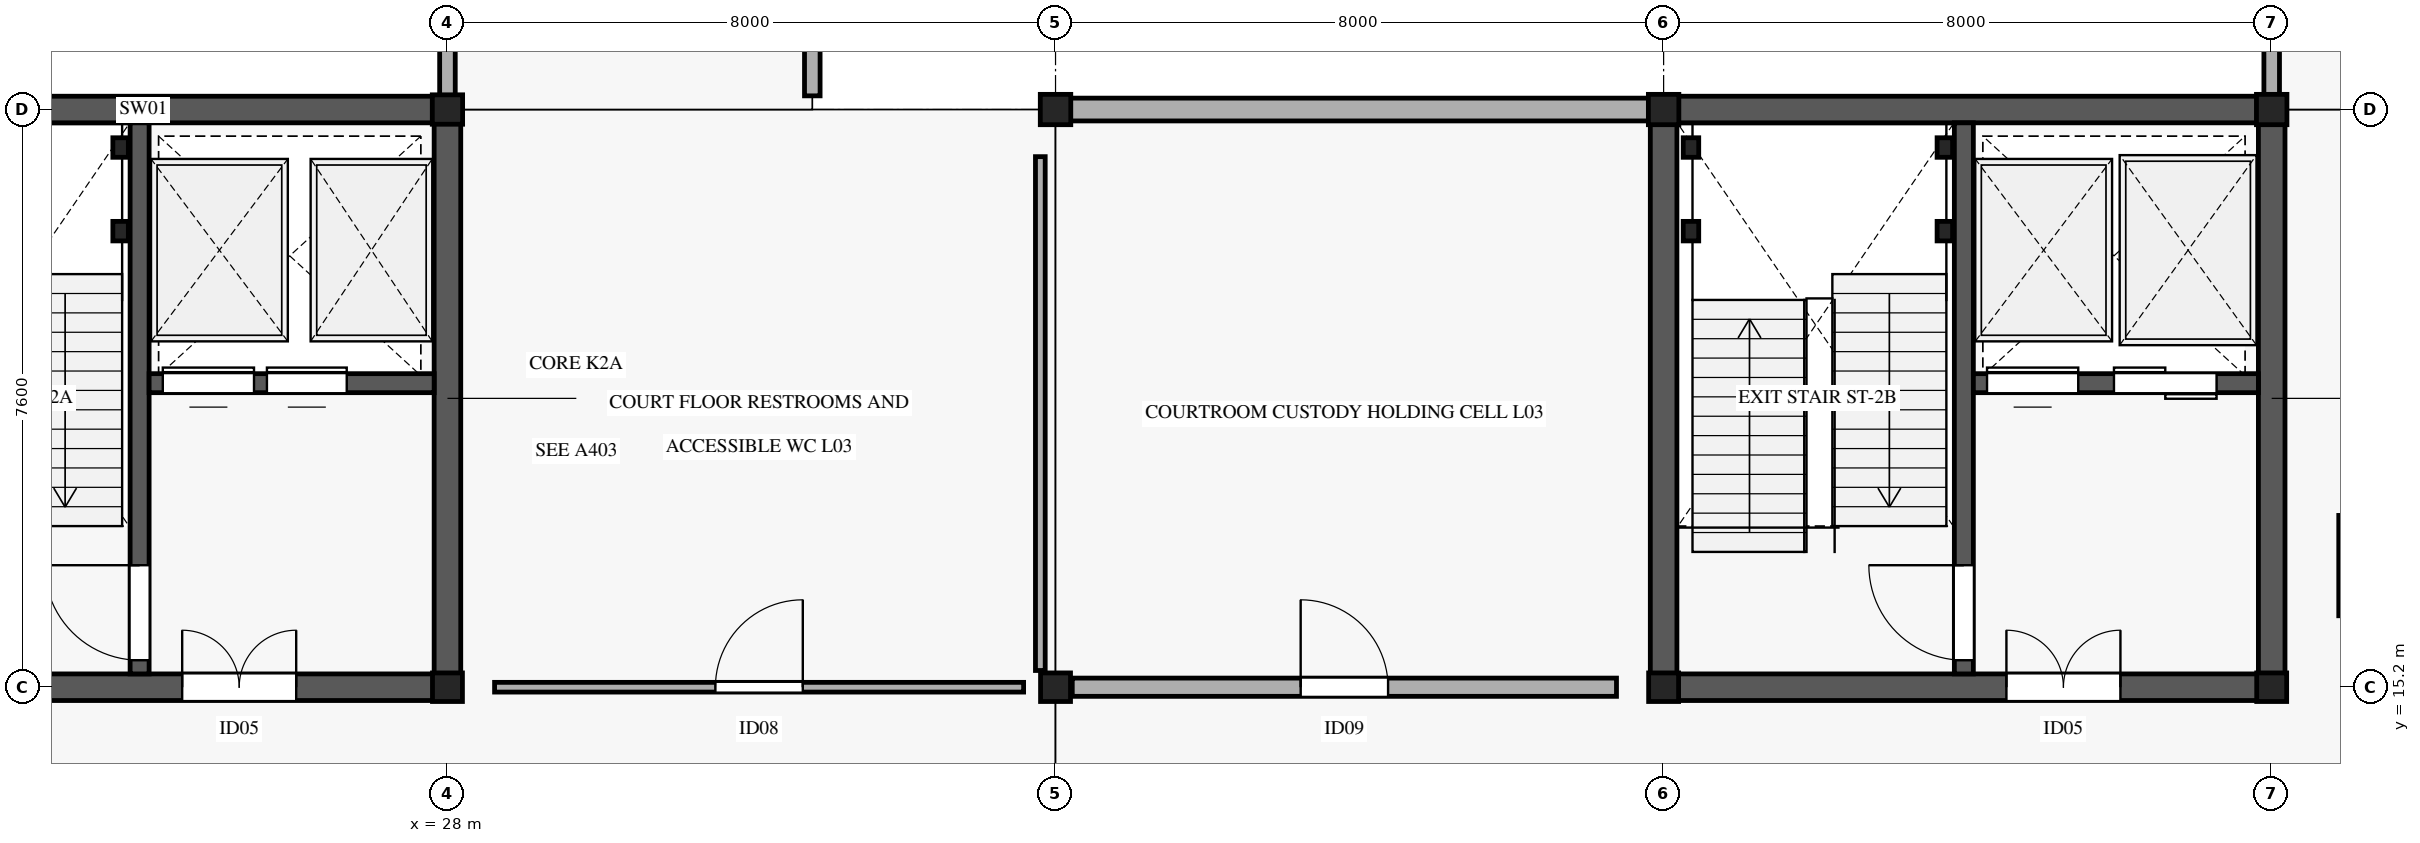
"""IFC4 building model, lengths in metres.
Left out: names, types, materials, properties, quantities, classifications, styles, units other than length and angle.
Written with IfcOpenShell. Run it as: python <this file> out.ifc"""

import sys

from ifc_helpers import new_model, si_unit, direction, frame, frame_2d, origin, origin_2d, place, context, subcontext, project, spatial, rectangle, i_section, extrude, element, fill, save


model = new_model("IFC4")
c1 = context("Model", 3, precision=1e-05, world=origin(), true_north=direction((0.0, 1.0)))
c2 = subcontext(c1, "Body", "Model", "MODEL_VIEW")
j1 = project(units=[si_unit("LENGTHUNIT", "METRE"), si_unit("PLANEANGLEUNIT", "RADIAN")], contexts=[c1])
p1 = place(None, origin())
s1 = spatial("IfcSite", under=j1, at=p1, CompositionType="ELEMENT")
p2 = place(p1, origin())
s2 = spatial("IfcBuilding", under=s1, at=p2, CompositionType="ELEMENT")
p3 = place(p2, frame((0.0, 0.0, 15.6)))
s3 = spatial("IfcBuildingStorey", under=s2, at=p3, CompositionType="ELEMENT", Elevation=15.6)
p4 = place(p3, frame((28.0, 15.2, 0.0), z_axis=(0.0, 0.0, 1.0), x_axis=(1.0, 0.0, 0.0)))
e1 = element("IfcColumn", 1, at=p4, inside=s3, PredefinedType="COLUMN", context=c2, shape_type="SweptSolid", body=[
    extrude(i_section(OverallWidth=0.394, OverallDepth=0.376, WebThickness=0.017, FlangeThickness=0.028, FilletRadius=0.015, at=origin_2d()), origin(), (0.0, 0.0, 1.0), 4.59),
])
p5 = place(p3, frame((28.0, 22.8, 0.0), z_axis=(0.0, 0.0, 1.0), x_axis=(1.0, 0.0, 0.0)))
e2 = element("IfcColumn", 2, at=p5, inside=s3, PredefinedType="COLUMN", context=c2, shape_type="SweptSolid", body=[
    extrude(i_section(OverallWidth=0.399, OverallDepth=0.387, WebThickness=0.021, FlangeThickness=0.033, FilletRadius=0.015, at=origin_2d()), origin(), (0.0, 0.0, 1.0), 4.59),
])
p6 = place(p3, frame((36.0, 15.2, 0.0), z_axis=(0.0, 0.0, 1.0), x_axis=(1.0, 0.0, 0.0)))
e3 = element("IfcColumn", 3, at=p6, inside=s3, PredefinedType="COLUMN", context=c2, shape_type="SweptSolid", body=[
    extrude(i_section(OverallWidth=0.394, OverallDepth=0.376, WebThickness=0.017, FlangeThickness=0.028, FilletRadius=0.015, at=origin_2d()), origin(), (0.0, 0.0, 1.0), 4.59),
])
p7 = place(p3, frame((36.0, 22.8, 0.0), z_axis=(0.0, 0.0, 1.0), x_axis=(1.0, 0.0, 0.0)))
e4 = element("IfcColumn", 4, at=p7, inside=s3, PredefinedType="COLUMN", context=c2, shape_type="SweptSolid", body=[
    extrude(i_section(OverallWidth=0.401, OverallDepth=0.399, WebThickness=0.025, FlangeThickness=0.04, FilletRadius=0.015, at=origin_2d()), origin(), (0.0, 0.0, 1.0), 4.59),
])
p8 = place(p3, frame((44.0, 15.2, 0.0), z_axis=(0.0, 0.0, 1.0), x_axis=(1.0, 0.0, 0.0)))
e5 = element("IfcColumn", 5, at=p8, inside=s3, PredefinedType="COLUMN", context=c2, shape_type="SweptSolid", body=[
    extrude(i_section(OverallWidth=0.394, OverallDepth=0.376, WebThickness=0.017, FlangeThickness=0.028, FilletRadius=0.015, at=origin_2d()), origin(), (0.0, 0.0, 1.0), 4.59),
])
p9 = place(p3, frame((44.0, 22.8, 0.0), z_axis=(0.0, 0.0, 1.0), x_axis=(1.0, 0.0, 0.0)))
e6 = element("IfcColumn", 6, at=p9, inside=s3, PredefinedType="COLUMN", context=c2, shape_type="SweptSolid", body=[
    extrude(i_section(OverallWidth=0.401, OverallDepth=0.399, WebThickness=0.025, FlangeThickness=0.04, FilletRadius=0.015, at=origin_2d()), origin(), (0.0, 0.0, 1.0), 4.59),
])
p10 = place(p3, frame((52.0, 15.2, 0.0), z_axis=(0.0, 0.0, 1.0), x_axis=(1.0, 0.0, 0.0)))
e7 = element("IfcColumn", 7, at=p10, inside=s3, PredefinedType="COLUMN", context=c2, shape_type="SweptSolid", body=[
    extrude(i_section(OverallWidth=0.394, OverallDepth=0.376, WebThickness=0.017, FlangeThickness=0.028, FilletRadius=0.015, at=origin_2d()), origin(), (0.0, 0.0, 1.0), 4.59),
])
p11 = place(p3, frame((52.0, 22.8, 0.0), z_axis=(0.0, 0.0, 1.0), x_axis=(1.0, 0.0, 0.0)))
e8 = element("IfcColumn", 8, at=p11, inside=s3, PredefinedType="COLUMN", context=c2, shape_type="SweptSolid", body=[
    extrude(i_section(OverallWidth=0.401, OverallDepth=0.399, WebThickness=0.025, FlangeThickness=0.04, FilletRadius=0.015, at=origin_2d()), origin(), (0.0, 0.0, 1.0), 4.59),
])
p12 = place(p3, frame((35.98, 22.8, 0.0), z_axis=(0.0, 0.0, 1.0), x_axis=(1.0, 0.0, 0.0)))
e9 = element("IfcWall", 9, at=p12, inside=s3, PredefinedType="STANDARD", context=c2, shape_type="SweptSolid", body=[
    extrude(rectangle(XDim=8.04, YDim=0.3, at=frame_2d((4.02, 0.0))), origin(), (0.0, 0.0, 1.0), 3.46),
])
p13 = place(p3, frame((28.0, 22.98, 0.0), z_axis=(0.0, 0.0, 1.0), x_axis=(0.0, 1.0, 0.0)))
e10 = element("IfcWall", 10, at=p13, inside=s3, PredefinedType="STANDARD", context=c2, shape_type="SweptSolid", body=[
    extrude(rectangle(XDim=22.84, YDim=0.205, at=frame_2d((11.42, 0.0))), origin(), (0.0, 0.0, 1.0), 4.02),
])
p14 = place(p13, frame((10.195, 0.0, 0.85)))
e11 = element("IfcOpeningElement", 11, at=p14, cuts=e10, PredefinedType="OPENING", context=c2, shape_type="SweptSolid", body=[
    extrude(rectangle(XDim=2.45, YDim=1.55, at=frame_2d((1.225, 0.775))), frame((0.0, 0.113, 0.0), z_axis=(0.0, -1.0, 0.0), x_axis=(1.0, 0.0, 0.0)), (0.0, 0.0, 1.0), 0.225),
])
p15 = place(p3, frame((32.8, 45.82, 0.0), z_axis=(0.0, 0.0, 1.0), x_axis=(0.0, -1.0, 0.0)))
e12 = element("IfcWall", 12, at=p15, inside=s3, PredefinedType="STANDARD", context=c2, shape_type="SweptSolid", body=[
    extrude(rectangle(XDim=22.84, YDim=0.205, at=frame_2d((11.42, 0.0))), origin(), (0.0, 0.0, 1.0), 4.02),
])
p16 = place(p15, frame((10.195, 0.0, 0.85)))
e13 = element("IfcOpeningElement", 13, at=p16, cuts=e12, PredefinedType="OPENING", context=c2, shape_type="SweptSolid", body=[
    extrude(rectangle(XDim=2.45, YDim=1.55, at=frame_2d((1.225, 0.775))), frame((0.0, 0.113, 0.0), z_axis=(0.0, -1.0, 0.0), x_axis=(1.0, 0.0, 0.0)), (0.0, 0.0, 1.0), 0.225),
])
p17 = place(p3, frame((52.0, 22.98, 0.0), z_axis=(0.0, 0.0, 1.0), x_axis=(0.0, 1.0, 0.0)))
e14 = element("IfcWall", 14, at=p17, inside=s3, PredefinedType="STANDARD", context=c2, shape_type="SweptSolid", body=[
    extrude(rectangle(XDim=22.84, YDim=0.205, at=frame_2d((11.42, 0.0))), origin(), (0.0, 0.0, 1.0), 4.02),
])
p18 = place(p17, frame((10.195, 0.0, 0.85)))
e15 = element("IfcOpeningElement", 15, at=p18, cuts=e14, PredefinedType="OPENING", context=c2, shape_type="SweptSolid", body=[
    extrude(rectangle(XDim=2.45, YDim=1.55, at=frame_2d((1.225, 0.775))), frame((0.0, 0.113, 0.0), z_axis=(0.0, -1.0, 0.0), x_axis=(1.0, 0.0, 0.0)), (0.0, 0.0, 1.0), 0.225),
])
p19 = place(p3, frame((52.94, 17.46, 0.0), z_axis=(0.0, 0.0, 1.0), x_axis=(0.0, -1.0, 0.0)))
e16 = element("IfcWall", 16, at=p19, inside=s3, PredefinedType="PARTITIONING", context=c2, shape_type="SweptSolid", body=[
    extrude(rectangle(XDim=1.32, YDim=0.115, at=frame_2d((0.66, 0.0))), origin(), (0.0, 0.0, 1.0), 3.75),
])
p20 = place(p3, frame((19.825, 15.2, 0.0), z_axis=(0.0, 0.0, 1.0), x_axis=(1.0, 0.0, 0.0)))
e17 = element("IfcWall", 17, at=p20, inside=s3, PredefinedType="SHEAR", context=c2, shape_type="SweptSolid", body=[
    extrude(rectangle(XDim=8.35, YDim=0.35, at=frame_2d((4.175, 0.0))), origin(), (0.0, 0.0, 1.0), 4.59),
])
p21 = place(p20, frame((4.685, 0.0, 0.0)))
e18 = element("IfcOpeningElement", 18, at=p21, cuts=e17, PredefinedType="OPENING", context=c2, shape_type="SweptSolid", body=[
    extrude(rectangle(XDim=1.5, YDim=2.2, at=frame_2d((0.75, 1.1))), frame((0.0, 0.185, 0.0), z_axis=(0.0, -1.0, 0.0), x_axis=(1.0, 0.0, 0.0)), (0.0, 0.0, 1.0), 0.37),
])
p22 = place(p3, frame((19.825, 22.8, 0.0), z_axis=(0.0, 0.0, 1.0), x_axis=(1.0, 0.0, 0.0)))
e19 = element("IfcWall", 19, at=p22, inside=s3, PredefinedType="SHEAR", context=c2, shape_type="SweptSolid", body=[
    extrude(rectangle(XDim=8.35, YDim=0.35, at=frame_2d((4.175, 0.0))), origin(), (0.0, 0.0, 1.0), 4.59),
])
p23 = place(p3, frame((28.0, 15.375, 0.0), z_axis=(0.0, 0.0, 1.0), x_axis=(0.0, 1.0, 0.0)))
e20 = element("IfcWall", 20, at=p23, inside=s3, PredefinedType="SHEAR", context=c2, shape_type="SweptSolid", body=[
    extrude(rectangle(XDim=7.25, YDim=0.35, at=frame_2d((3.625, 0.0))), origin(), (0.0, 0.0, 1.0), 4.59),
])
p24 = place(p3, frame((23.95, 15.375, 0.0), z_axis=(0.0, 0.0, 1.0), x_axis=(0.0, 1.0, 0.0)))
e21 = element("IfcWall", 21, at=p24, inside=s3, PredefinedType="SHEAR", context=c2, shape_type="SweptSolid", body=[
    extrude(rectangle(XDim=7.25, YDim=0.25, at=frame_2d((3.625, 0.0))), origin(), (0.0, 0.0, 1.0), 4.59),
])
p25 = place(p24, frame((0.18, 0.0, 0.0)))
e22 = element("IfcOpeningElement", 22, at=p25, cuts=e21, PredefinedType="OPENING", context=c2, shape_type="SweptSolid", body=[
    extrude(rectangle(XDim=1.25, YDim=2.2, at=frame_2d((0.625, 1.1))), frame((0.0, 0.135, 0.0), z_axis=(0.0, -1.0, 0.0), x_axis=(1.0, 0.0, 0.0)), (0.0, 0.0, 1.0), 0.27),
])
p26 = place(p3, frame((24.075, 19.2, 0.0), z_axis=(0.0, 0.0, 1.0), x_axis=(1.0, 0.0, 0.0)))
e23 = element("IfcWall", 23, at=p26, inside=s3, PredefinedType="SHEAR", context=c2, shape_type="SweptSolid", body=[
    extrude(rectangle(XDim=3.75, YDim=0.25, at=frame_2d((1.875, 0.0))), origin(), (0.0, 0.0, 1.0), 4.59),
])
p27 = place(p26, frame((0.18, 0.0, 0.0)))
e24 = element("IfcOpeningElement", 24, at=p27, cuts=e23, PredefinedType="OPENING", context=c2, shape_type="SweptSolid", body=[
    extrude(rectangle(XDim=1.2, YDim=2.2, at=frame_2d((0.6, 1.1))), frame((0.0, 0.135, 0.0), z_axis=(0.0, -1.0, 0.0), x_axis=(1.0, 0.0, 0.0)), (0.0, 0.0, 1.0), 0.27),
])
p28 = place(p26, frame((1.55, 0.0, 0.0)))
e25 = element("IfcOpeningElement", 25, at=p28, cuts=e23, PredefinedType="OPENING", context=c2, shape_type="SweptSolid", body=[
    extrude(rectangle(XDim=1.05, YDim=2.2, at=frame_2d((0.525, 1.1))), frame((0.0, 0.135, 0.0), z_axis=(0.0, -1.0, 0.0), x_axis=(1.0, 0.0, 0.0)), (0.0, 0.0, 1.0), 0.27),
])
for number, where, z_axis, x_axis in (
    (26, (23.7, 21.2, 0.0), (0.0, 0.0, 1.0), (1.0, 0.0, 0.0)),
    (27, (23.7, 22.3, 0.0), (0.0, 0.0, 1.0), (1.0, 0.0, 0.0)),
):
    element("IfcColumn", number, at=place(p3, frame(where, z_axis=z_axis, x_axis=x_axis)), inside=s3, PredefinedType="COLUMN", context=c2, shape_type="SweptSolid", body=[
        extrude(i_section(OverallWidth=0.204, OverallDepth=0.257, WebThickness=0.009, FlangeThickness=0.016, FilletRadius=0.013, at=origin_2d()), origin(), (0.0, 0.0, 1.0), 4.795),
    ])
p29 = place(p3, frame((43.825, 15.2, 0.0), z_axis=(0.0, 0.0, 1.0), x_axis=(1.0, 0.0, 0.0)))
e28 = element("IfcWall", 28, at=p29, inside=s3, PredefinedType="SHEAR", context=c2, shape_type="SweptSolid", body=[
    extrude(rectangle(XDim=8.35, YDim=0.35, at=frame_2d((4.175, 0.0))), origin(), (0.0, 0.0, 1.0), 4.59),
])
p30 = place(p29, frame((4.685, 0.0, 0.0)))
e29 = element("IfcOpeningElement", 29, at=p30, cuts=e28, PredefinedType="OPENING", context=c2, shape_type="SweptSolid", body=[
    extrude(rectangle(XDim=1.5, YDim=2.2, at=frame_2d((0.75, 1.1))), frame((0.0, 0.185, 0.0), z_axis=(0.0, -1.0, 0.0), x_axis=(1.0, 0.0, 0.0)), (0.0, 0.0, 1.0), 0.37),
])
p31 = place(p3, frame((43.825, 22.8, 0.0), z_axis=(0.0, 0.0, 1.0), x_axis=(1.0, 0.0, 0.0)))
e30 = element("IfcWall", 30, at=p31, inside=s3, PredefinedType="SHEAR", context=c2, shape_type="SweptSolid", body=[
    extrude(rectangle(XDim=8.35, YDim=0.35, at=frame_2d((4.175, 0.0))), origin(), (0.0, 0.0, 1.0), 4.59),
])
for number, where, z_axis, x_axis in (
    (31, (44.0, 15.375, 0.0), (0.0, 0.0, 1.0), (0.0, 1.0, 0.0)),
    (32, (52.0, 15.375, 0.0), (0.0, 0.0, 1.0), (0.0, 1.0, 0.0)),
):
    element("IfcWall", number, at=place(p3, frame(where, z_axis=z_axis, x_axis=x_axis)), inside=s3, PredefinedType="SHEAR", context=c2, shape_type="SweptSolid", body=[
        extrude(rectangle(XDim=7.25, YDim=0.35, at=frame_2d((3.625, 0.0))), origin(), (0.0, 0.0, 1.0), 4.59),
    ])
p32 = place(p3, frame((47.95, 15.375, 0.0), z_axis=(0.0, 0.0, 1.0), x_axis=(0.0, 1.0, 0.0)))
e33 = element("IfcWall", 33, at=p32, inside=s3, PredefinedType="SHEAR", context=c2, shape_type="SweptSolid", body=[
    extrude(rectangle(XDim=7.25, YDim=0.25, at=frame_2d((3.625, 0.0))), origin(), (0.0, 0.0, 1.0), 4.59),
])
p33 = place(p32, frame((0.18, 0.0, 0.0)))
e34 = element("IfcOpeningElement", 34, at=p33, cuts=e33, PredefinedType="OPENING", context=c2, shape_type="SweptSolid", body=[
    extrude(rectangle(XDim=1.25, YDim=2.2, at=frame_2d((0.625, 1.1))), frame((0.0, 0.135, 0.0), z_axis=(0.0, -1.0, 0.0), x_axis=(1.0, 0.0, 0.0)), (0.0, 0.0, 1.0), 0.27),
])
p34 = place(p3, frame((48.075, 19.2, 0.0), z_axis=(0.0, 0.0, 1.0), x_axis=(1.0, 0.0, 0.0)))
e35 = element("IfcWall", 35, at=p34, inside=s3, PredefinedType="SHEAR", context=c2, shape_type="SweptSolid", body=[
    extrude(rectangle(XDim=3.75, YDim=0.25, at=frame_2d((1.875, 0.0))), origin(), (0.0, 0.0, 1.0), 4.59),
])
p35 = place(p34, frame((0.18, 0.0, 0.0)))
e36 = element("IfcOpeningElement", 36, at=p35, cuts=e35, PredefinedType="OPENING", context=c2, shape_type="SweptSolid", body=[
    extrude(rectangle(XDim=1.2, YDim=2.2, at=frame_2d((0.6, 1.1))), frame((0.0, 0.135, 0.0), z_axis=(0.0, -1.0, 0.0), x_axis=(1.0, 0.0, 0.0)), (0.0, 0.0, 1.0), 0.27),
])
p36 = place(p34, frame((1.85, 0.0, 0.0)))
e37 = element("IfcOpeningElement", 37, at=p36, cuts=e35, PredefinedType="OPENING", context=c2, shape_type="SweptSolid", body=[
    extrude(rectangle(XDim=1.35, YDim=2.2, at=frame_2d((0.675, 1.1))), frame((0.0, 0.135, 0.0), z_axis=(0.0, -1.0, 0.0), x_axis=(1.0, 0.0, 0.0)), (0.0, 0.0, 1.0), 0.27),
])
for number, where, z_axis, x_axis in (
    (38, (44.36, 21.2, 0.0), (0.0, 0.0, 1.0), (1.0, 0.0, 0.0)),
    (39, (47.7, 21.2, 0.0), (0.0, 0.0, 1.0), (1.0, 0.0, 0.0)),
    (40, (44.36, 22.3, 0.0), (0.0, 0.0, 1.0), (1.0, 0.0, 0.0)),
    (41, (47.7, 22.3, 0.0), (0.0, 0.0, 1.0), (1.0, 0.0, 0.0)),
):
    element("IfcColumn", number, at=place(p3, frame(where, z_axis=z_axis, x_axis=x_axis)), inside=s3, PredefinedType="COLUMN", context=c2, shape_type="SweptSolid", body=[
        extrude(i_section(OverallWidth=0.204, OverallDepth=0.257, WebThickness=0.009, FlangeThickness=0.016, FilletRadius=0.013, at=origin_2d()), origin(), (0.0, 0.0, 1.0), 4.795),
    ])
p37 = place(p3, frame((28.62, 15.2, 0.0), z_axis=(0.0, 0.0, 1.0), x_axis=(1.0, 0.0, 0.0)))
e42 = element("IfcWall", 42, at=p37, inside=s3, PredefinedType="PARTITIONING", context=c2, shape_type="SweptSolid", body=[
    extrude(rectangle(XDim=6.96, YDim=0.128, at=frame_2d((3.48, 0.0))), origin(), (0.0, 0.0, 1.0), 3.45),
])
p38 = place(p37, frame((2.905, 0.0, 0.0)))
e43 = element("IfcOpeningElement", 43, at=p38, cuts=e42, PredefinedType="OPENING", context=c2, shape_type="SweptSolid", body=[
    extrude(rectangle(XDim=1.15, YDim=2.2, at=frame_2d((0.575, 1.1))), frame((0.0, 0.074, 0.0), z_axis=(0.0, -1.0, 0.0), x_axis=(1.0, 0.0, 0.0)), (0.0, 0.0, 1.0), 0.148),
])
p39 = place(p3, frame((35.8, 15.42, 0.0), z_axis=(0.0, 0.0, 1.0), x_axis=(0.0, 1.0, 0.0)))
e44 = element("IfcWall", 44, at=p39, inside=s3, PredefinedType="PARTITIONING", context=c2, shape_type="SweptSolid", body=[
    extrude(rectangle(XDim=6.76, YDim=0.128, at=frame_2d((3.38, 0.0))), origin(), (0.0, 0.0, 1.0), 3.45),
])
p40 = place(p3, frame((36.22, 15.2, 0.0), z_axis=(0.0, 0.0, 1.0), x_axis=(1.0, 0.0, 0.0)))
e45 = element("IfcWall", 45, at=p40, inside=s3, PredefinedType="PARTITIONING", context=c2, shape_type="SweptSolid", body=[
    extrude(rectangle(XDim=7.16, YDim=0.24, at=frame_2d((3.58, 0.0))), origin(), (0.0, 0.0, 1.0), 3.45),
])
p41 = place(p40, frame((3.005, 0.0, 0.0)))
e46 = element("IfcOpeningElement", 46, at=p41, cuts=e45, PredefinedType="OPENING", context=c2, shape_type="SweptSolid", body=[
    extrude(rectangle(XDim=1.15, YDim=2.15, at=frame_2d((0.575, 1.075))), frame((0.0, 0.13, 0.0), z_axis=(0.0, -1.0, 0.0), x_axis=(1.0, 0.0, 0.0)), (0.0, 0.0, 1.0), 0.26),
])
p42 = place(p25, origin())
e47 = element("IfcDoor", 47, at=p42, inside=s3, OperationType="SINGLE_SWING_RIGHT", PredefinedType="DOOR", context=c2, shape_type="SweptSolid", body=[
    extrude(rectangle(XDim=1.25, YDim=2.2, at=frame_2d((0.625, 1.1))), frame((0.0, 0.025, 0.0), z_axis=(0.0, -1.0, 0.0), x_axis=(1.0, 0.0, 0.0)), (0.0, 0.0, 1.0), 0.05),
])
fill(e22, e47)
p43 = place(p21, origin())
e48 = element("IfcDoor", 48, at=p43, inside=s3, OperationType="DOUBLE_DOOR_SINGLE_SWING", PredefinedType="DOOR", context=c2, shape_type="SweptSolid", body=[
    extrude(rectangle(XDim=1.5, YDim=2.2, at=frame_2d((0.75, 1.1))), frame((0.0, 0.025, 0.0), z_axis=(0.0, -1.0, 0.0), x_axis=(1.0, 0.0, 0.0)), (0.0, 0.0, 1.0), 0.05),
])
fill(e18, e48)
p44 = place(p27, origin())
e49 = element("IfcDoor", 49, at=p44, inside=s3, OperationType="SLIDING_TO_LEFT", PredefinedType="DOOR", context=c2, shape_type="SweptSolid", body=[
    extrude(rectangle(XDim=1.2, YDim=2.2, at=frame_2d((0.6, 1.1))), frame((0.0, 0.025, 0.0), z_axis=(0.0, -1.0, 0.0), x_axis=(1.0, 0.0, 0.0)), (0.0, 0.0, 1.0), 0.05),
])
fill(e24, e49)
p45 = place(p28, origin())
e50 = element("IfcDoor", 50, at=p45, inside=s3, OperationType="SLIDING_TO_RIGHT", PredefinedType="DOOR", context=c2, shape_type="SweptSolid", body=[
    extrude(rectangle(XDim=1.05, YDim=2.2, at=frame_2d((0.525, 1.1))), frame((0.0, 0.025, 0.0), z_axis=(0.0, -1.0, 0.0), x_axis=(1.0, 0.0, 0.0)), (0.0, 0.0, 1.0), 0.05),
])
fill(e25, e50)
p46 = place(p33, origin())
e51 = element("IfcDoor", 51, at=p46, inside=s3, OperationType="SINGLE_SWING_RIGHT", PredefinedType="DOOR", context=c2, shape_type="SweptSolid", body=[
    extrude(rectangle(XDim=1.25, YDim=2.2, at=frame_2d((0.625, 1.1))), frame((0.0, 0.025, 0.0), z_axis=(0.0, -1.0, 0.0), x_axis=(1.0, 0.0, 0.0)), (0.0, 0.0, 1.0), 0.05),
])
fill(e34, e51)
p47 = place(p30, origin())
e52 = element("IfcDoor", 52, at=p47, inside=s3, OperationType="DOUBLE_DOOR_SINGLE_SWING", PredefinedType="DOOR", context=c2, shape_type="SweptSolid", body=[
    extrude(rectangle(XDim=1.5, YDim=2.2, at=frame_2d((0.75, 1.1))), frame((0.0, 0.025, 0.0), z_axis=(0.0, -1.0, 0.0), x_axis=(1.0, 0.0, 0.0)), (0.0, 0.0, 1.0), 0.05),
])
fill(e29, e52)
p48 = place(p35, origin())
e53 = element("IfcDoor", 53, at=p48, inside=s3, OperationType="SLIDING_TO_LEFT", PredefinedType="DOOR", context=c2, shape_type="SweptSolid", body=[
    extrude(rectangle(XDim=1.2, YDim=2.2, at=frame_2d((0.6, 1.1))), frame((0.0, 0.025, 0.0), z_axis=(0.0, -1.0, 0.0), x_axis=(1.0, 0.0, 0.0)), (0.0, 0.0, 1.0), 0.05),
])
fill(e36, e53)
p49 = place(p36, origin())
e54 = element("IfcDoor", 54, at=p49, inside=s3, OperationType="DOUBLE_DOOR_SLIDING", PredefinedType="DOOR", context=c2, shape_type="SweptSolid", body=[
    extrude(rectangle(XDim=1.35, YDim=2.2, at=frame_2d((0.675, 1.1))), frame((0.0, 0.025, 0.0), z_axis=(0.0, -1.0, 0.0), x_axis=(1.0, 0.0, 0.0)), (0.0, 0.0, 1.0), 0.05),
])
fill(e37, e54)
p50 = place(p38, origin())
e55 = element("IfcDoor", 55, at=p50, inside=s3, OperationType="SINGLE_SWING_RIGHT", PredefinedType="DOOR", context=c2, shape_type="SweptSolid", body=[
    extrude(rectangle(XDim=1.15, YDim=2.2, at=frame_2d((0.575, 1.1))), frame((0.0, 0.025, 0.0), z_axis=(0.0, -1.0, 0.0), x_axis=(1.0, 0.0, 0.0)), (0.0, 0.0, 1.0), 0.05),
])
fill(e43, e55)
p51 = place(p41, origin())
e56 = element("IfcDoor", 56, at=p51, inside=s3, OperationType="SINGLE_SWING_LEFT", PredefinedType="DOOR", context=c2, shape_type="SweptSolid", body=[
    extrude(rectangle(XDim=1.15, YDim=2.15, at=frame_2d((0.575, 1.075))), frame((0.0, 0.025, 0.0), z_axis=(0.0, -1.0, 0.0), x_axis=(1.0, 0.0, 0.0)), (0.0, 0.0, 1.0), 0.05),
])
fill(e46, e56)
save(model, sys.argv[1])
